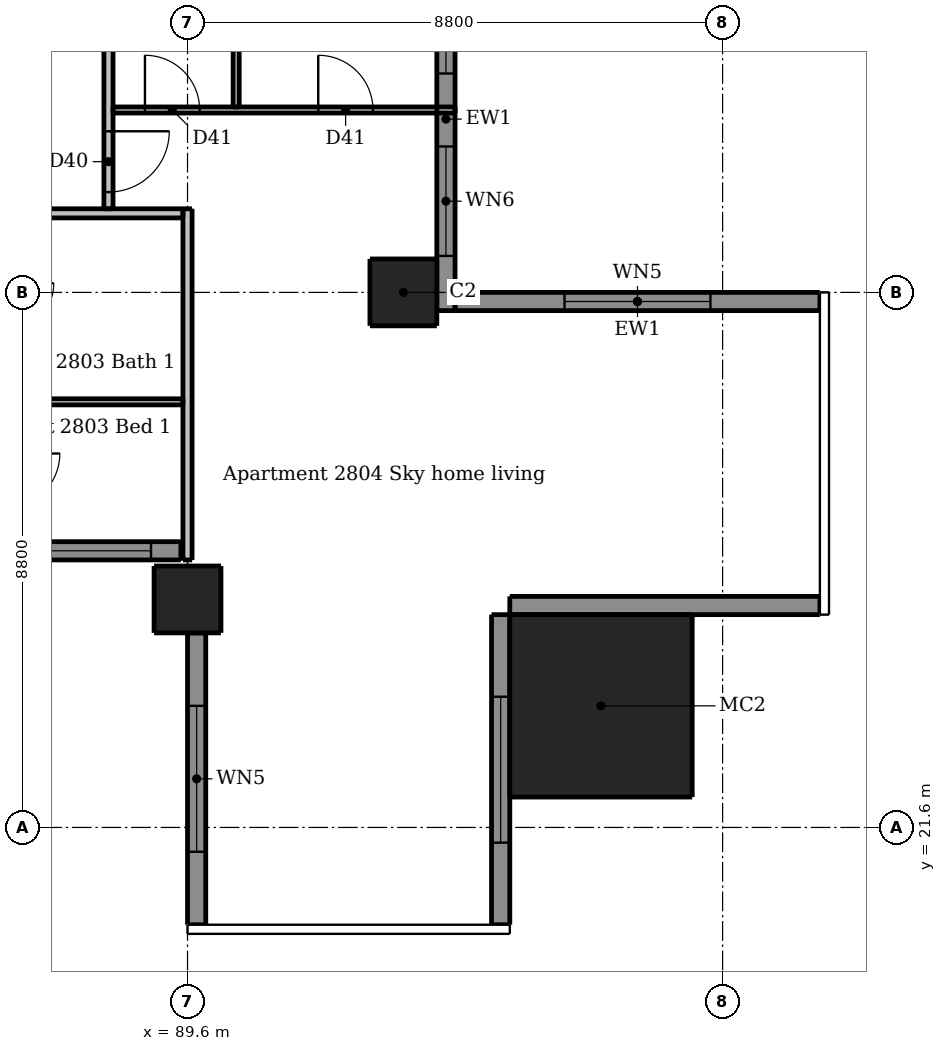
"""IFC4 building model, lengths in metres.
Left out: names, types, materials, properties, quantities, classifications, styles, units other than length and angle.
Written with IfcOpenShell. Run it as: python <this file> out.ifc"""

import sys

from ifc_helpers import new_model, si_unit, direction, frame, frame_2d, origin, origin_2d, place, context, subcontext, project, spatial, rectangle, extrude, element, fill, save


model = new_model("IFC4")
c1 = context("Model", 3, precision=1e-05, world=origin(), true_north=direction((0.0, 1.0)))
c2 = subcontext(c1, "Body", "Model", "MODEL_VIEW")
j1 = project(units=[si_unit("LENGTHUNIT", "METRE"), si_unit("PLANEANGLEUNIT", "RADIAN")], contexts=[c1])
p1 = place(None, origin())
s1 = spatial("IfcSite", under=j1, at=p1, CompositionType="ELEMENT")
p2 = place(p1, origin())
s2 = spatial("IfcBuilding", under=s1, at=p2, CompositionType="ELEMENT")
p3 = place(p2, frame((0.0, 0.0, 105.1)))
s3 = spatial("IfcBuildingStorey", under=s2, at=p3, CompositionType="ELEMENT", Elevation=105.1)
for number, where, z_axis, x_axis in (
    (1, (89.6, 25.35, 0.0), (0.0, 0.0, 1.0), (1.0, 0.0, 0.0)),
    (2, (93.15, 30.4, 0.0), (0.0, 0.0, 1.0), (1.0, 0.0, 0.0)),
):
    element("IfcColumn", number, at=place(p3, frame(where, z_axis=z_axis, x_axis=x_axis)), inside=s3, PredefinedType="COLUMN", context=c2, shape_type="SweptSolid", body=[
        extrude(rectangle(XDim=1.1, YDim=1.1, at=origin_2d()), origin(), (0.0, 0.0, 1.0), 3.05),
    ])
p4 = place(p3, frame((96.4, 23.6, 0.0), z_axis=(0.0, 0.0, 1.0), x_axis=(1.0, 0.0, 0.0)))
e3 = element("IfcColumn", 3, at=p4, inside=s3, PredefinedType="COLUMN", context=c2, shape_type="SweptSolid", body=[
    extrude(rectangle(XDim=3.0, YDim=3.0, at=origin_2d()), origin(), (0.0, 0.0, 1.0), 3.3),
])
p5 = place(p3, frame((89.75, 24.8, 0.0), z_axis=(0.0, 0.0, 1.0), x_axis=(0.0, -1.0, 0.0)))
e4 = element("IfcWall", 4, at=p5, inside=s3, PredefinedType="SOLIDWALL", context=c2, shape_type="SweptSolid", body=[
    extrude(rectangle(XDim=4.8, YDim=0.3, at=frame_2d((2.4, 0.0))), origin(), (0.0, 0.0, 1.0), 3.05),
])
p6 = place(p5, frame((1.2, 0.0, 0.15)))
e5 = element("IfcOpeningElement", 5, at=p6, cuts=e4, PredefinedType="OPENING", context=c2, shape_type="SweptSolid", body=[
    extrude(rectangle(XDim=2.4, YDim=2.1, at=frame_2d((1.2, 1.05))), frame((0.0, 0.16, 0.0), z_axis=(0.0, -1.0, 0.0), x_axis=(1.0, 0.0, 0.0)), (0.0, 0.0, 1.0), 0.32),
])
p7 = place(p3, frame((94.75, 20.0, 0.0), z_axis=(0.0, 0.0, 1.0), x_axis=(0.0, 1.0, 0.0)))
e6 = element("IfcWall", 6, at=p7, inside=s3, PredefinedType="SOLIDWALL", context=c2, shape_type="SweptSolid", body=[
    extrude(rectangle(XDim=5.1, YDim=0.3, at=frame_2d((2.55, 0.0))), origin(), (0.0, 0.0, 1.0), 3.05),
])
p8 = place(p7, frame((1.35, 0.0, 0.15)))
e7 = element("IfcOpeningElement", 7, at=p8, cuts=e6, PredefinedType="OPENING", context=c2, shape_type="SweptSolid", body=[
    extrude(rectangle(XDim=2.4, YDim=2.1, at=frame_2d((1.2, 1.05))), frame((0.0, 0.16, 0.0), z_axis=(0.0, -1.0, 0.0), x_axis=(1.0, 0.0, 0.0)), (0.0, 0.0, 1.0), 0.32),
])
p9 = place(p3, frame((94.9, 25.25, 0.0), z_axis=(0.0, 0.0, 1.0), x_axis=(1.0, 0.0, 0.0)))
e8 = element("IfcWall", 8, at=p9, inside=s3, PredefinedType="SOLIDWALL", context=c2, shape_type="SweptSolid", body=[
    extrude(rectangle(XDim=5.1, YDim=0.3, at=frame_2d((2.55, 0.0))), origin(), (0.0, 0.0, 1.0), 3.05),
])
p10 = place(p3, frame((100.0, 30.25, 0.0), z_axis=(0.0, 0.0, 1.0), x_axis=(-1.0, 0.0, 0.0)))
e9 = element("IfcWall", 9, at=p10, inside=s3, PredefinedType="SOLIDWALL", context=c2, shape_type="SweptSolid", body=[
    extrude(rectangle(XDim=6.0, YDim=0.3, at=frame_2d((3.0, 0.0))), origin(), (0.0, 0.0, 1.0), 3.05),
])
p11 = place(p10, frame((1.8, 0.0, 0.15)))
e10 = element("IfcOpeningElement", 10, at=p11, cuts=e9, PredefinedType="OPENING", context=c2, shape_type="SweptSolid", body=[
    extrude(rectangle(XDim=2.4, YDim=2.1, at=frame_2d((1.2, 1.05))), frame((0.0, 0.16, 0.0), z_axis=(0.0, -1.0, 0.0), x_axis=(1.0, 0.0, 0.0)), (0.0, 0.0, 1.0), 0.32),
])
p12 = place(p3, frame((83.7, 26.15, 0.0), z_axis=(0.0, 0.0, 1.0), x_axis=(1.0, 0.0, 0.0)))
e11 = element("IfcWall", 11, at=p12, inside=s3, PredefinedType="SOLIDWALL", context=c2, shape_type="SweptSolid", body=[
    extrude(rectangle(XDim=5.79, YDim=0.3, at=frame_2d((2.895, 0.0))), origin(), (0.0, 0.0, 1.0), 3.05),
])
p13 = place(p12, frame((0.5, 0.0, 0.15)))
e12 = element("IfcOpeningElement", 12, at=p13, cuts=e11, PredefinedType="OPENING", context=c2, shape_type="SweptSolid", body=[
    extrude(rectangle(XDim=1.8, YDim=2.1, at=frame_2d((0.9, 1.05))), frame((0.0, 0.16, 0.0), z_axis=(0.0, -1.0, 0.0), x_axis=(1.0, 0.0, 0.0)), (0.0, 0.0, 1.0), 0.32),
])
p14 = place(p12, frame((3.5, 0.0, 0.15)))
e13 = element("IfcOpeningElement", 13, at=p14, cuts=e11, PredefinedType="OPENING", context=c2, shape_type="SweptSolid", body=[
    extrude(rectangle(XDim=1.8, YDim=2.1, at=frame_2d((0.9, 1.05))), frame((0.0, 0.16, 0.0), z_axis=(0.0, -1.0, 0.0), x_axis=(1.0, 0.0, 0.0)), (0.0, 0.0, 1.0), 0.32),
])
p15 = place(p3, frame((93.85, 30.1, 0.0), z_axis=(0.0, 0.0, 1.0), x_axis=(0.0, 1.0, 0.0)))
e14 = element("IfcWall", 14, at=p15, inside=s3, PredefinedType="SOLIDWALL", context=c2, shape_type="SweptSolid", body=[
    extrude(rectangle(XDim=6.3, YDim=0.3, at=frame_2d((3.15, 0.0))), origin(), (0.0, 0.0, 1.0), 3.05),
])
p16 = place(p15, frame((0.9, 0.0, 0.15)))
e15 = element("IfcOpeningElement", 15, at=p16, cuts=e14, PredefinedType="OPENING", context=c2, shape_type="SweptSolid", body=[
    extrude(rectangle(XDim=1.8, YDim=2.1, at=frame_2d((0.9, 1.05))), frame((0.0, 0.16, 0.0), z_axis=(0.0, -1.0, 0.0), x_axis=(1.0, 0.0, 0.0)), (0.0, 0.0, 1.0), 0.32),
])
p17 = place(p15, frame((3.9, 0.0, 0.15)))
e16 = element("IfcOpeningElement", 16, at=p17, cuts=e14, PredefinedType="OPENING", context=c2, shape_type="SweptSolid", body=[
    extrude(rectangle(XDim=1.8, YDim=2.1, at=frame_2d((0.9, 1.05))), frame((0.0, 0.16, 0.0), z_axis=(0.0, -1.0, 0.0), x_axis=(1.0, 0.0, 0.0)), (0.0, 0.0, 1.0), 0.32),
])
p18 = place(p3, frame((90.4, 33.45, 0.0), z_axis=(0.0, 0.0, 1.0), x_axis=(0.0, 1.0, 0.0)))
e17 = element("IfcWall", 17, at=p18, inside=s3, PredefinedType="PARTITIONING", context=c2, shape_type="SweptSolid", body=[
    extrude(rectangle(XDim=8.9, YDim=0.1, at=frame_2d((4.45, 0.0))), origin(), (0.0, 0.0, 1.0), 3.05),
])
p19 = place(p18, frame((3.75, 0.0, 0.0)))
e18 = element("IfcOpeningElement", 18, at=p19, cuts=e17, PredefinedType="OPENING", context=c2, shape_type="SweptSolid", body=[
    extrude(rectangle(XDim=0.8, YDim=2.1, at=frame_2d((0.4, 1.05))), frame((0.0, 0.06, 0.0), z_axis=(0.0, -1.0, 0.0), x_axis=(1.0, 0.0, 0.0)), (0.0, 0.0, 1.0), 0.12),
])
p20 = place(p3, frame((88.375, 33.4, 0.0), z_axis=(0.0, 0.0, 1.0), x_axis=(1.0, 0.0, 0.0)))
e19 = element("IfcWall", 19, at=p20, inside=s3, PredefinedType="PARTITIONING", context=c2, shape_type="SweptSolid", body=[
    extrude(rectangle(XDim=5.625, YDim=0.1, at=frame_2d((2.812, 0.0))), origin(), (0.0, 0.0, 1.0), 3.05),
])
p21 = place(p20, frame((0.525, 0.0, 0.0)))
e20 = element("IfcOpeningElement", 20, at=p21, cuts=e19, PredefinedType="OPENING", context=c2, shape_type="SweptSolid", body=[
    extrude(rectangle(XDim=0.9, YDim=2.1, at=frame_2d((0.45, 1.05))), frame((0.0, 0.06, 0.0), z_axis=(0.0, -1.0, 0.0), x_axis=(1.0, 0.0, 0.0)), (0.0, 0.0, 1.0), 0.12),
])
p22 = place(p20, frame((3.375, 0.0, 0.0)))
e21 = element("IfcOpeningElement", 21, at=p22, cuts=e19, PredefinedType="OPENING", context=c2, shape_type="SweptSolid", body=[
    extrude(rectangle(XDim=0.9, YDim=2.1, at=frame_2d((0.45, 1.05))), frame((0.0, 0.06, 0.0), z_axis=(0.0, -1.0, 0.0), x_axis=(1.0, 0.0, 0.0)), (0.0, 0.0, 1.0), 0.12),
])
p23 = place(p3, frame((86.65, 28.6, 0.0), z_axis=(0.0, 0.0, 1.0), x_axis=(1.0, 0.0, 0.0)))
e22 = element("IfcWall", 22, at=p23, inside=s3, PredefinedType="PARTITIONING", context=c2, shape_type="SweptSolid", body=[
    extrude(rectangle(XDim=2.875, YDim=0.1, at=frame_2d((1.438, 0.0))), origin(), (0.0, 0.0, 1.0), 3.05),
])
p24 = place(p3, frame((88.3, 60.475, 0.0), z_axis=(0.0, 0.0, 1.0), x_axis=(0.0, -1.0, 0.0)))
e23 = element("IfcWall", 23, at=p24, inside=s3, PredefinedType="PARTITIONING", context=c2, shape_type="SweptSolid", body=[
    extrude(rectangle(XDim=28.7, YDim=0.15, at=frame_2d((14.35, 0.0))), origin(), (0.0, 0.0, 1.0), 3.05),
])
p25 = place(p24, frame((27.425, 0.0, 0.0)))
e24 = element("IfcOpeningElement", 24, at=p25, cuts=e23, PredefinedType="OPENING", context=c2, shape_type="SweptSolid", body=[
    extrude(rectangle(XDim=1.0, YDim=2.1, at=frame_2d((0.5, 1.05))), frame((0.0, 0.085, 0.0), z_axis=(0.0, -1.0, 0.0), x_axis=(1.0, 0.0, 0.0)), (0.0, 0.0, 1.0), 0.17),
])
p26 = place(p24, frame((14.575, 0.0, 0.0)))
e25 = element("IfcOpeningElement", 25, at=p26, cuts=e23, PredefinedType="OPENING", context=c2, shape_type="SweptSolid", body=[
    extrude(rectangle(XDim=1.0, YDim=2.1, at=frame_2d((0.5, 1.05))), frame((0.0, 0.085, 0.0), z_axis=(0.0, -1.0, 0.0), x_axis=(1.0, 0.0, 0.0)), (0.0, 0.0, 1.0), 0.17),
])
p27 = place(p24, frame((3.775, 0.0, 0.0)))
e26 = element("IfcOpeningElement", 26, at=p27, cuts=e23, PredefinedType="OPENING", context=c2, shape_type="SweptSolid", body=[
    extrude(rectangle(XDim=1.0, YDim=2.1, at=frame_2d((0.5, 1.05))), frame((0.0, 0.085, 0.0), z_axis=(0.0, -1.0, 0.0), x_axis=(1.0, 0.0, 0.0)), (0.0, 0.0, 1.0), 0.17),
])
p28 = place(p3, frame((89.6, 26.0, 0.0), z_axis=(0.0, 0.0, 1.0), x_axis=(0.0, 1.0, 0.0)))
e27 = element("IfcWall", 27, at=p28, inside=s3, PredefinedType="PARTITIONING", context=c2, shape_type="SweptSolid", body=[
    extrude(rectangle(XDim=5.775, YDim=0.15, at=frame_2d((2.887, 0.0))), origin(), (0.0, 0.0, 1.0), 2.516),
])
p29 = place(p3, frame((89.525, 31.7, 0.0), z_axis=(0.0, 0.0, 1.0), x_axis=(-1.0, 0.0, 0.0)))
e28 = element("IfcWall", 28, at=p29, inside=s3, PredefinedType="PARTITIONING", context=c2, shape_type="SweptSolid", body=[
    extrude(rectangle(XDim=28.75, YDim=0.15, at=frame_2d((14.375, 0.0))), origin(), (0.0, 0.0, 1.0), 3.05),
])
p30 = place(p29, frame((25.875, 0.0, 0.0)))
e29 = element("IfcOpeningElement", 29, at=p30, cuts=e28, PredefinedType="OPENING", context=c2, shape_type="SweptSolid", body=[
    extrude(rectangle(XDim=1.0, YDim=2.1, at=frame_2d((0.5, 1.05))), frame((0.0, 0.085, 0.0), z_axis=(0.0, -1.0, 0.0), x_axis=(1.0, 0.0, 0.0)), (0.0, 0.0, 1.0), 0.17),
])
p31 = place(p29, frame((12.525, 0.0, 0.0)))
e30 = element("IfcOpeningElement", 30, at=p31, cuts=e28, PredefinedType="OPENING", context=c2, shape_type="SweptSolid", body=[
    extrude(rectangle(XDim=1.0, YDim=2.1, at=frame_2d((0.5, 1.05))), frame((0.0, 0.085, 0.0), z_axis=(0.0, -1.0, 0.0), x_axis=(1.0, 0.0, 0.0)), (0.0, 0.0, 1.0), 0.17),
])
p32 = place(p29, frame((4.175, 0.0, 0.0)))
e31 = element("IfcOpeningElement", 31, at=p32, cuts=e28, PredefinedType="OPENING", context=c2, shape_type="SweptSolid", body=[
    extrude(rectangle(XDim=1.0, YDim=2.1, at=frame_2d((0.5, 1.05))), frame((0.0, 0.085, 0.0), z_axis=(0.0, -1.0, 0.0), x_axis=(1.0, 0.0, 0.0)), (0.0, 0.0, 1.0), 0.17),
])
p33 = place(p6, origin())
e32 = element("IfcWindow", 32, at=p33, inside=s3, PartitioningType="DOUBLE_PANEL_VERTICAL", PredefinedType="WINDOW", context=c2, shape_type="SweptSolid", body=[
    extrude(rectangle(XDim=2.4, YDim=2.1, at=frame_2d((1.2, 1.05))), frame((0.0, 0.03, 0.0), z_axis=(0.0, -1.0, 0.0), x_axis=(1.0, 0.0, 0.0)), (0.0, 0.0, 1.0), 0.06),
])
fill(e5, e32)
p34 = place(p8, origin())
e33 = element("IfcWindow", 33, at=p34, inside=s3, PartitioningType="DOUBLE_PANEL_VERTICAL", PredefinedType="WINDOW", context=c2, shape_type="SweptSolid", body=[
    extrude(rectangle(XDim=2.4, YDim=2.1, at=frame_2d((1.2, 1.05))), frame((0.0, 0.03, 0.0), z_axis=(0.0, -1.0, 0.0), x_axis=(1.0, 0.0, 0.0)), (0.0, 0.0, 1.0), 0.06),
])
fill(e7, e33)
p35 = place(p11, origin())
e34 = element("IfcWindow", 34, at=p35, inside=s3, PartitioningType="DOUBLE_PANEL_VERTICAL", PredefinedType="WINDOW", context=c2, shape_type="SweptSolid", body=[
    extrude(rectangle(XDim=2.4, YDim=2.1, at=frame_2d((1.2, 1.05))), frame((0.0, 0.03, 0.0), z_axis=(0.0, -1.0, 0.0), x_axis=(1.0, 0.0, 0.0)), (0.0, 0.0, 1.0), 0.06),
])
fill(e10, e34)
p36 = place(p14, origin())
e35 = element("IfcWindow", 35, at=p36, inside=s3, PartitioningType="DOUBLE_PANEL_VERTICAL", PredefinedType="WINDOW", context=c2, shape_type="SweptSolid", body=[
    extrude(rectangle(XDim=1.8, YDim=2.1, at=frame_2d((0.9, 1.05))), frame((0.0, 0.03, 0.0), z_axis=(0.0, -1.0, 0.0), x_axis=(1.0, 0.0, 0.0)), (0.0, 0.0, 1.0), 0.06),
])
fill(e13, e35)
p37 = place(p16, origin())
e36 = element("IfcWindow", 36, at=p37, inside=s3, PartitioningType="DOUBLE_PANEL_VERTICAL", PredefinedType="WINDOW", context=c2, shape_type="SweptSolid", body=[
    extrude(rectangle(XDim=1.8, YDim=2.1, at=frame_2d((0.9, 1.05))), frame((0.0, 0.03, 0.0), z_axis=(0.0, -1.0, 0.0), x_axis=(1.0, 0.0, 0.0)), (0.0, 0.0, 1.0), 0.06),
])
fill(e15, e36)
p38 = place(p17, origin())
e37 = element("IfcWindow", 37, at=p38, inside=s3, PartitioningType="DOUBLE_PANEL_VERTICAL", PredefinedType="WINDOW", context=c2, shape_type="SweptSolid", body=[
    extrude(rectangle(XDim=1.8, YDim=2.1, at=frame_2d((0.9, 1.05))), frame((0.0, 0.03, 0.0), z_axis=(0.0, -1.0, 0.0), x_axis=(1.0, 0.0, 0.0)), (0.0, 0.0, 1.0), 0.06),
])
fill(e16, e37)
p39 = place(p25, origin())
e38 = element("IfcDoor", 38, at=p39, inside=s3, OperationType="SINGLE_SWING_LEFT", PredefinedType="DOOR", context=c2, shape_type="SweptSolid", body=[
    extrude(rectangle(XDim=1.0, YDim=2.1, at=frame_2d((0.5, 1.05))), frame((0.0, 0.025, 0.0), z_axis=(0.0, -1.0, 0.0), x_axis=(1.0, 0.0, 0.0)), (0.0, 0.0, 1.0), 0.05),
])
fill(e24, e38)
p40 = place(p21, origin())
e39 = element("IfcDoor", 39, at=p40, inside=s3, OperationType="SINGLE_SWING_LEFT", PredefinedType="DOOR", context=c2, shape_type="SweptSolid", body=[
    extrude(rectangle(XDim=0.9, YDim=2.1, at=frame_2d((0.45, 1.05))), frame((0.0, 0.025, 0.0), z_axis=(0.0, -1.0, 0.0), x_axis=(1.0, 0.0, 0.0)), (0.0, 0.0, 1.0), 0.05),
])
fill(e20, e39)
p41 = place(p22, origin())
e40 = element("IfcDoor", 40, at=p41, inside=s3, OperationType="SINGLE_SWING_LEFT", PredefinedType="DOOR", context=c2, shape_type="SweptSolid", body=[
    extrude(rectangle(XDim=0.9, YDim=2.1, at=frame_2d((0.45, 1.05))), frame((0.0, 0.025, 0.0), z_axis=(0.0, -1.0, 0.0), x_axis=(1.0, 0.0, 0.0)), (0.0, 0.0, 1.0), 0.05),
])
fill(e21, e40)
save(model, sys.argv[1])
